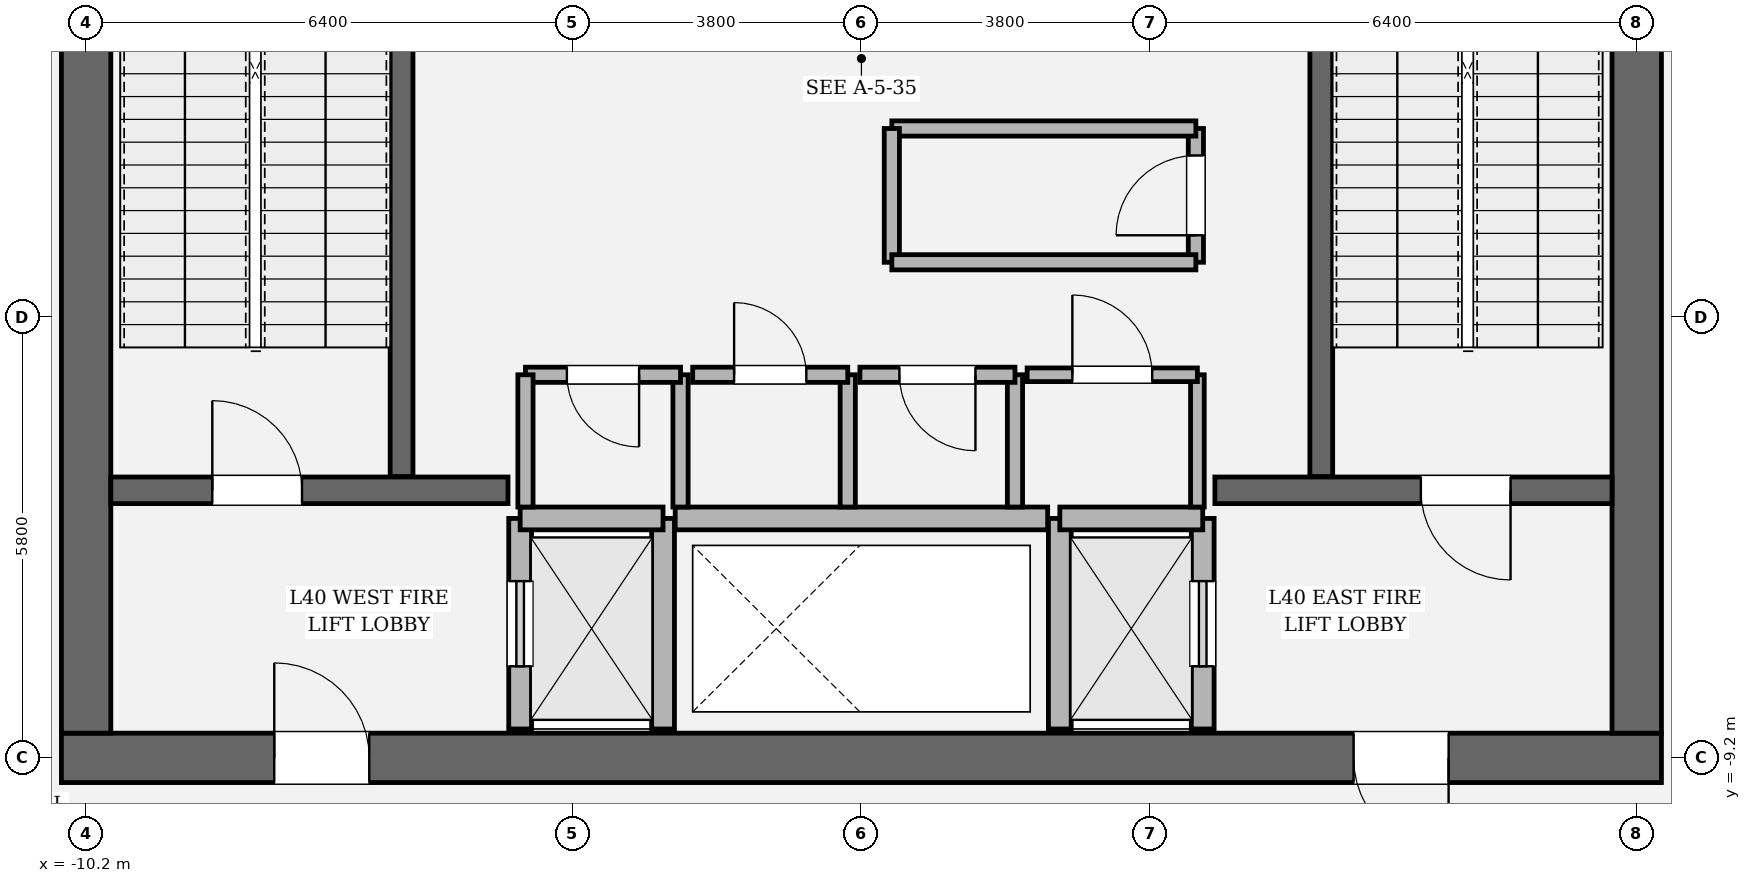
"""IFC4 building model, lengths in metres.
Left out: names, types, materials, properties, quantities, classifications, styles, units other than length and angle.
Written with IfcOpenShell. Run it as: python <this file> out.ifc"""

import sys

from ifc_helpers import new_model, si_unit, direction, frame, frame_2d, origin, place, context, subcontext, project, spatial, rectangle, extrude, element, fill, save


model = new_model("IFC4")
c1 = context("Model", 3, precision=1e-05, world=origin(), true_north=direction((0.0, 1.0)))
c2 = subcontext(c1, "Body", "Model", "MODEL_VIEW")
j1 = project(units=[si_unit("LENGTHUNIT", "METRE"), si_unit("PLANEANGLEUNIT", "RADIAN")], contexts=[c1])
p1 = place(None, origin())
s1 = spatial("IfcSite", under=j1, at=p1, CompositionType="ELEMENT")
p2 = place(p1, origin())
s2 = spatial("IfcBuilding", under=s1, at=p2, CompositionType="ELEMENT")
p3 = place(p2, frame((0.0, 0.0, 172.2)))
s3 = spatial("IfcBuildingStorey", under=s2, at=p3, CompositionType="ELEMENT", Elevation=172.2)
p4 = place(p3, frame((10.525, -9.2, 0.0), z_axis=(0.0, 0.0, 1.0), x_axis=(-1.0, 0.0, 0.0)))
e1 = element("IfcWall", 1, at=p4, inside=s3, PredefinedType="SHEAR", context=c2, shape_type="SweptSolid", body=[
    extrude(rectangle(XDim=21.05, YDim=0.65, at=frame_2d((10.525, 0.0))), origin(), (0.0, 0.0, 1.0), 4.05),
])
p5 = place(p4, frame((2.8, 0.0, 0.0)))
e2 = element("IfcOpeningElement", 2, at=p5, cuts=e1, PredefinedType="OPENING", context=c2, shape_type="SweptSolid", body=[
    extrude(rectangle(XDim=1.25, YDim=2.25, at=frame_2d((0.625, 1.125))), frame((0.0, 0.335, 0.0), z_axis=(0.0, -1.0, 0.0), x_axis=(1.0, 0.0, 0.0)), (0.0, 0.0, 1.0), 0.67),
])
p6 = place(p4, frame((17.0, 0.0, 0.0)))
e3 = element("IfcOpeningElement", 3, at=p6, cuts=e1, PredefinedType="OPENING", context=c2, shape_type="SweptSolid", body=[
    extrude(rectangle(XDim=1.25, YDim=2.25, at=frame_2d((0.625, 1.125))), frame((0.0, 0.335, 0.0), z_axis=(0.0, -1.0, 0.0), x_axis=(1.0, 0.0, 0.0)), (0.0, 0.0, 1.0), 0.67),
])
p7 = place(p3, frame((-10.2, -8.875, 0.0), z_axis=(0.0, 0.0, 1.0), x_axis=(0.0, 1.0, 0.0)))
e4 = element("IfcWall", 4, at=p7, inside=s3, PredefinedType="SHEAR", context=c2, shape_type="SweptSolid", body=[
    extrude(rectangle(XDim=17.75, YDim=0.65, at=frame_2d((8.875, 0.0))), origin(), (0.0, 0.0, 1.0), 4.05),
])
p8 = place(p7, frame((12.665, 0.0, 0.0)))
e5 = element("IfcOpeningElement", 5, at=p8, cuts=e4, PredefinedType="OPENING", context=c2, shape_type="SweptSolid", body=[
    extrude(rectangle(XDim=1.18, YDim=2.2, at=frame_2d((0.59, 1.1))), frame((0.0, 0.335, 0.0), z_axis=(0.0, -1.0, 0.0), x_axis=(1.0, 0.0, 0.0)), (0.0, 0.0, 1.0), 0.67),
])
p9 = place(p3, frame((10.2, 8.875, 0.0), z_axis=(0.0, 0.0, 1.0), x_axis=(0.0, -1.0, 0.0)))
e6 = element("IfcWall", 6, at=p9, inside=s3, PredefinedType="SHEAR", context=c2, shape_type="SweptSolid", body=[
    extrude(rectangle(XDim=17.75, YDim=0.65, at=frame_2d((8.875, 0.0))), origin(), (0.0, 0.0, 1.0), 4.05),
])
p10 = place(p9, frame((3.905, 0.0, 0.0)))
e7 = element("IfcOpeningElement", 7, at=p10, cuts=e6, PredefinedType="OPENING", context=c2, shape_type="SweptSolid", body=[
    extrude(rectangle(XDim=1.18, YDim=2.2, at=frame_2d((0.59, 1.1))), frame((0.0, 0.335, 0.0), z_axis=(0.0, -1.0, 0.0), x_axis=(1.0, 0.0, 0.0)), (0.0, 0.0, 1.0), 0.67),
])
for number, where, z_axis, x_axis in (
    (8, (-6.05, -5.5, 0.0), (0.0, 0.0, 1.0), (0.0, 1.0, 0.0)),
    (9, (6.05, 3.45, 0.0), (0.0, 0.0, 1.0), (0.0, -1.0, 0.0)),
):
    element("IfcWall", number, at=place(p3, frame(where, z_axis=z_axis, x_axis=x_axis)), inside=s3, PredefinedType="SOLIDWALL", context=c2, shape_type="SweptSolid", body=[
        extrude(rectangle(XDim=8.95, YDim=0.3, at=frame_2d((4.475, 0.0))), origin(), (0.0, 0.0, 1.0), 4.05),
    ])
p11 = place(p3, frame((-9.875, -5.68, 0.0), z_axis=(0.0, 0.0, 1.0), x_axis=(1.0, 0.0, 0.0)))
e10 = element("IfcWall", 10, at=p11, inside=s3, PredefinedType="SOLIDWALL", context=c2, shape_type="SweptSolid", body=[
    extrude(rectangle(XDim=5.225, YDim=0.35, at=frame_2d((2.613, 0.0))), origin(), (0.0, 0.0, 1.0), 4.05),
])
p12 = place(p11, frame((1.335, 0.0, 0.0)))
e11 = element("IfcOpeningElement", 11, at=p12, cuts=e10, PredefinedType="OPENING", context=c2, shape_type="SweptSolid", body=[
    extrude(rectangle(XDim=1.18, YDim=2.2, at=frame_2d((0.59, 1.1))), frame((0.0, 0.185, 0.0), z_axis=(0.0, -1.0, 0.0), x_axis=(1.0, 0.0, 0.0)), (0.0, 0.0, 1.0), 0.37),
])
p13 = place(p3, frame((4.65, -5.68, 0.0), z_axis=(0.0, 0.0, 1.0), x_axis=(1.0, 0.0, 0.0)))
e12 = element("IfcWall", 12, at=p13, inside=s3, PredefinedType="SOLIDWALL", context=c2, shape_type="SweptSolid", body=[
    extrude(rectangle(XDim=5.225, YDim=0.35, at=frame_2d((2.613, 0.0))), origin(), (0.0, 0.0, 1.0), 4.05),
])
p14 = place(p13, frame((2.71, 0.0, 0.0)))
e13 = element("IfcOpeningElement", 13, at=p14, cuts=e12, PredefinedType="OPENING", context=c2, shape_type="SweptSolid", body=[
    extrude(rectangle(XDim=1.18, YDim=2.2, at=frame_2d((0.59, 1.1))), frame((0.0, 0.185, 0.0), z_axis=(0.0, -1.0, 0.0), x_axis=(1.0, 0.0, 0.0)), (0.0, 0.0, 1.0), 0.37),
])
p15 = place(p3, frame((-4.49, -8.82, 0.0), z_axis=(0.0, 0.0, 1.0), x_axis=(0.0, 1.0, 0.0)))
e14 = element("IfcWall", 14, at=p15, inside=s3, PredefinedType="SOLIDWALL", context=c2, shape_type="SweptSolid", body=[
    extrude(rectangle(XDim=2.77, YDim=0.3, at=frame_2d((1.385, 0.0))), origin(), (0.0, 0.0, 1.0), 3.83),
])
p16 = place(p15, frame((0.825, 0.0, 0.0)))
e15 = element("IfcOpeningElement", 15, at=p16, cuts=e14, PredefinedType="OPENING", context=c2, shape_type="SweptSolid", body=[
    extrude(rectangle(XDim=1.12, YDim=2.25, at=frame_2d((0.56, 1.125))), frame((0.0, 0.16, 0.0), z_axis=(0.0, -1.0, 0.0), x_axis=(1.0, 0.0, 0.0)), (0.0, 0.0, 1.0), 0.32),
])
p17 = place(p3, frame((-2.61, -8.82, 0.0), z_axis=(0.0, 0.0, 1.0), x_axis=(0.0, 1.0, 0.0)))
e16 = element("IfcWall", 16, at=p17, inside=s3, PredefinedType="SOLIDWALL", context=c2, shape_type="SweptSolid", body=[
    extrude(rectangle(XDim=2.77, YDim=0.3, at=frame_2d((1.385, 0.0))), origin(), (0.0, 0.0, 1.0), 3.83),
])
p18 = place(p3, frame((-4.49, -6.05, 0.0), z_axis=(0.0, 0.0, 1.0), x_axis=(1.0, 0.0, 0.0)))
e17 = element("IfcWall", 17, at=p18, inside=s3, PredefinedType="SOLIDWALL", context=c2, shape_type="SweptSolid", body=[
    extrude(rectangle(XDim=1.88, YDim=0.3, at=frame_2d((0.94, 0.0))), origin(), (0.0, 0.0, 1.0), 3.83),
])
p19 = place(p3, frame((4.49, -8.82, 0.0), z_axis=(0.0, 0.0, 1.0), x_axis=(0.0, 1.0, 0.0)))
e18 = element("IfcWall", 18, at=p19, inside=s3, PredefinedType="SOLIDWALL", context=c2, shape_type="SweptSolid", body=[
    extrude(rectangle(XDim=2.77, YDim=0.3, at=frame_2d((1.385, 0.0))), origin(), (0.0, 0.0, 1.0), 3.83),
])
p20 = place(p19, frame((0.825, 0.0, 0.0)))
e19 = element("IfcOpeningElement", 19, at=p20, cuts=e18, PredefinedType="OPENING", context=c2, shape_type="SweptSolid", body=[
    extrude(rectangle(XDim=1.12, YDim=2.25, at=frame_2d((0.56, 1.125))), frame((0.0, 0.16, 0.0), z_axis=(0.0, -1.0, 0.0), x_axis=(1.0, 0.0, 0.0)), (0.0, 0.0, 1.0), 0.32),
])
p21 = place(p3, frame((2.61, -8.82, 0.0), z_axis=(0.0, 0.0, 1.0), x_axis=(0.0, 1.0, 0.0)))
e20 = element("IfcWall", 20, at=p21, inside=s3, PredefinedType="SOLIDWALL", context=c2, shape_type="SweptSolid", body=[
    extrude(rectangle(XDim=2.77, YDim=0.3, at=frame_2d((1.385, 0.0))), origin(), (0.0, 0.0, 1.0), 3.83),
])
p22 = place(p3, frame((2.61, -6.05, 0.0), z_axis=(0.0, 0.0, 1.0), x_axis=(1.0, 0.0, 0.0)))
e21 = element("IfcWall", 21, at=p22, inside=s3, PredefinedType="SOLIDWALL", context=c2, shape_type="SweptSolid", body=[
    extrude(rectangle(XDim=1.88, YDim=0.3, at=frame_2d((0.94, 0.0))), origin(), (0.0, 0.0, 1.0), 3.83),
])
p23 = place(p3, frame((-2.45, -6.05, 0.0), z_axis=(0.0, 0.0, 1.0), x_axis=(1.0, 0.0, 0.0)))
e22 = element("IfcWall", 22, at=p23, inside=s3, PredefinedType="SOLIDWALL", context=c2, shape_type="SweptSolid", body=[
    extrude(rectangle(XDim=4.9, YDim=0.3, at=frame_2d((2.45, 0.0))), origin(), (0.0, 0.0, 1.0), 3.83),
])
p24 = place(p3, frame((-2.38, -5.9, 0.0), z_axis=(0.0, 0.0, 1.0), x_axis=(0.0, 1.0, 0.0)))
e23 = element("IfcWall", 23, at=p24, inside=s3, PredefinedType="SOLIDWALL", context=c2, shape_type="SweptSolid", body=[
    extrude(rectangle(XDim=1.74, YDim=0.2, at=frame_2d((0.87, 0.0))), origin(), (0.0, 0.0, 1.0), 3.83),
])
p25 = place(p3, frame((-2.38, -4.16, 0.0), z_axis=(0.0, 0.0, 1.0), x_axis=(-1.0, 0.0, 0.0)))
e24 = element("IfcWall", 24, at=p25, inside=s3, PredefinedType="SOLIDWALL", context=c2, shape_type="SweptSolid", body=[
    extrude(rectangle(XDim=2.04, YDim=0.2, at=frame_2d((1.02, 0.0))), origin(), (0.0, 0.0, 1.0), 3.83),
])
p26 = place(p25, frame((0.545, 0.0, 0.0)))
e25 = element("IfcOpeningElement", 25, at=p26, cuts=e24, PredefinedType="OPENING", context=c2, shape_type="SweptSolid", body=[
    extrude(rectangle(XDim=0.95, YDim=2.15, at=frame_2d((0.475, 1.075))), frame((0.0, 0.11, 0.0), z_axis=(0.0, -1.0, 0.0), x_axis=(1.0, 0.0, 0.0)), (0.0, 0.0, 1.0), 0.22),
])
for number, where, z_axis, x_axis in (
    (26, (-4.42, -4.16, 0.0), (0.0, 0.0, 1.0), (0.0, -1.0, 0.0)),
    (27, (-0.18, -5.9, 0.0), (0.0, 0.0, 1.0), (0.0, 1.0, 0.0)),
):
    element("IfcWall", number, at=place(p3, frame(where, z_axis=z_axis, x_axis=x_axis)), inside=s3, PredefinedType="SOLIDWALL", context=c2, shape_type="SweptSolid", body=[
        extrude(rectangle(XDim=1.74, YDim=0.2, at=frame_2d((0.87, 0.0))), origin(), (0.0, 0.0, 1.0), 3.83),
    ])
p27 = place(p3, frame((-0.18, -4.16, 0.0), z_axis=(0.0, 0.0, 1.0), x_axis=(-1.0, 0.0, 0.0)))
e28 = element("IfcWall", 28, at=p27, inside=s3, PredefinedType="SOLIDWALL", context=c2, shape_type="SweptSolid", body=[
    extrude(rectangle(XDim=2.04, YDim=0.2, at=frame_2d((1.02, 0.0))), origin(), (0.0, 0.0, 1.0), 3.83),
])
p28 = place(p27, frame((0.545, 0.0, 0.0)))
e29 = element("IfcOpeningElement", 29, at=p28, cuts=e28, PredefinedType="OPENING", context=c2, shape_type="SweptSolid", body=[
    extrude(rectangle(XDim=0.95, YDim=2.15, at=frame_2d((0.475, 1.075))), frame((0.0, 0.11, 0.0), z_axis=(0.0, -1.0, 0.0), x_axis=(1.0, 0.0, 0.0)), (0.0, 0.0, 1.0), 0.22),
])
p29 = place(p3, frame((2.02, -5.9, 0.0), z_axis=(0.0, 0.0, 1.0), x_axis=(0.0, 1.0, 0.0)))
e30 = element("IfcWall", 30, at=p29, inside=s3, PredefinedType="SOLIDWALL", context=c2, shape_type="SweptSolid", body=[
    extrude(rectangle(XDim=1.74, YDim=0.2, at=frame_2d((0.87, 0.0))), origin(), (0.0, 0.0, 1.0), 3.83),
])
p30 = place(p3, frame((2.02, -4.16, 0.0), z_axis=(0.0, 0.0, 1.0), x_axis=(-1.0, 0.0, 0.0)))
e31 = element("IfcWall", 31, at=p30, inside=s3, PredefinedType="SOLIDWALL", context=c2, shape_type="SweptSolid", body=[
    extrude(rectangle(XDim=2.04, YDim=0.2, at=frame_2d((1.02, 0.0))), origin(), (0.0, 0.0, 1.0), 3.83),
])
p31 = place(p30, frame((0.52, 0.0, 0.0)))
e32 = element("IfcOpeningElement", 32, at=p31, cuts=e31, PredefinedType="OPENING", context=c2, shape_type="SweptSolid", body=[
    extrude(rectangle(XDim=1.0, YDim=2.15, at=frame_2d((0.5, 1.075))), frame((0.0, 0.11, 0.0), z_axis=(0.0, -1.0, 0.0), x_axis=(1.0, 0.0, 0.0)), (0.0, 0.0, 1.0), 0.22),
])
p32 = place(p3, frame((4.42, -5.9, 0.0), z_axis=(0.0, 0.0, 1.0), x_axis=(0.0, 1.0, 0.0)))
e33 = element("IfcWall", 33, at=p32, inside=s3, PredefinedType="PARTITIONING", context=c2, shape_type="SweptSolid", body=[
    extrude(rectangle(XDim=1.74, YDim=0.18, at=frame_2d((0.87, 0.0))), origin(), (0.0, 0.0, 1.0), 3.83),
])
p33 = place(p3, frame((4.42, -4.16, 0.0), z_axis=(0.0, 0.0, 1.0), x_axis=(-1.0, 0.0, 0.0)))
e34 = element("IfcWall", 34, at=p33, inside=s3, PredefinedType="PARTITIONING", context=c2, shape_type="SweptSolid", body=[
    extrude(rectangle(XDim=2.24, YDim=0.18, at=frame_2d((1.12, 0.0))), origin(), (0.0, 0.0, 1.0), 3.83),
])
p34 = place(p33, frame((0.595, 0.0, 0.0)))
e35 = element("IfcOpeningElement", 35, at=p34, cuts=e34, PredefinedType="OPENING", context=c2, shape_type="SweptSolid", body=[
    extrude(rectangle(XDim=1.05, YDim=2.2, at=frame_2d((0.525, 1.1))), frame((0.0, 0.1, 0.0), z_axis=(0.0, -1.0, 0.0), x_axis=(1.0, 0.0, 0.0)), (0.0, 0.0, 1.0), 0.2),
])
p35 = place(p3, frame((4.4, -2.68, 0.0), z_axis=(0.0, 0.0, 1.0), x_axis=(0.0, 1.0, 0.0)))
e36 = element("IfcWall", 36, at=p35, inside=s3, PredefinedType="SOLIDWALL", context=c2, shape_type="SweptSolid", body=[
    extrude(rectangle(XDim=1.76, YDim=0.2, at=frame_2d((0.88, 0.0))), origin(), (0.0, 0.0, 1.0), 3.83),
])
p36 = place(p35, frame((0.355, 0.0, 0.0)))
e37 = element("IfcOpeningElement", 37, at=p36, cuts=e36, PredefinedType="OPENING", context=c2, shape_type="SweptSolid", body=[
    extrude(rectangle(XDim=1.05, YDim=2.2, at=frame_2d((0.525, 1.1))), frame((0.0, 0.11, 0.0), z_axis=(0.0, -1.0, 0.0), x_axis=(1.0, 0.0, 0.0)), (0.0, 0.0, 1.0), 0.22),
])
p37 = place(p3, frame((4.4, -0.92, 0.0), z_axis=(0.0, 0.0, 1.0), x_axis=(-1.0, 0.0, 0.0)))
e38 = element("IfcWall", 38, at=p37, inside=s3, PredefinedType="SOLIDWALL", context=c2, shape_type="SweptSolid", body=[
    extrude(rectangle(XDim=4.0, YDim=0.2, at=frame_2d((2.0, 0.0))), origin(), (0.0, 0.0, 1.0), 3.83),
])
p38 = place(p3, frame((0.4, -0.92, 0.0), z_axis=(0.0, 0.0, 1.0), x_axis=(0.0, -1.0, 0.0)))
e39 = element("IfcWall", 39, at=p38, inside=s3, PredefinedType="SOLIDWALL", context=c2, shape_type="SweptSolid", body=[
    extrude(rectangle(XDim=1.76, YDim=0.2, at=frame_2d((0.88, 0.0))), origin(), (0.0, 0.0, 1.0), 3.83),
])
p39 = place(p3, frame((0.4, -2.68, 0.0), z_axis=(0.0, 0.0, 1.0), x_axis=(1.0, 0.0, 0.0)))
e40 = element("IfcWall", 40, at=p39, inside=s3, PredefinedType="SOLIDWALL", context=c2, shape_type="SweptSolid", body=[
    extrude(rectangle(XDim=4.0, YDim=0.2, at=frame_2d((2.0, 0.0))), origin(), (0.0, 0.0, 1.0), 3.83),
])
p40 = place(p12, origin())
e41 = element("IfcDoor", 41, at=p40, inside=s3, OperationType="SINGLE_SWING_LEFT", PredefinedType="DOOR", context=c2, shape_type="SweptSolid", body=[
    extrude(rectangle(XDim=1.18, YDim=2.2, at=frame_2d((0.59, 1.1))), frame((0.0, 0.025, 0.0), z_axis=(0.0, -1.0, 0.0), x_axis=(1.0, 0.0, 0.0)), (0.0, 0.0, 1.0), 0.05),
])
fill(e11, e41)
p41 = place(p14, origin())
e42 = element("IfcDoor", 42, at=p41, inside=s3, OperationType="SINGLE_SWING_RIGHT", PredefinedType="DOOR", context=c2, shape_type="SweptSolid", body=[
    extrude(rectangle(XDim=1.18, YDim=2.2, at=frame_2d((0.59, 1.1))), frame((0.0, 0.025, 0.0), z_axis=(0.0, -1.0, 0.0), x_axis=(1.0, 0.0, 0.0)), (0.0, 0.0, 1.0), 0.05),
])
fill(e13, e42)
p42 = place(p5, origin())
e43 = element("IfcDoor", 43, at=p42, inside=s3, OperationType="SINGLE_SWING_LEFT", PredefinedType="DOOR", context=c2, shape_type="SweptSolid", body=[
    extrude(rectangle(XDim=1.25, YDim=2.25, at=frame_2d((0.625, 1.125))), frame((0.0, 0.025, 0.0), z_axis=(0.0, -1.0, 0.0), x_axis=(1.0, 0.0, 0.0)), (0.0, 0.0, 1.0), 0.05),
])
fill(e2, e43)
p43 = place(p6, origin())
e44 = element("IfcDoor", 44, at=p43, inside=s3, OperationType="SINGLE_SWING_RIGHT", PredefinedType="DOOR", context=c2, shape_type="SweptSolid", body=[
    extrude(rectangle(XDim=1.25, YDim=2.25, at=frame_2d((0.625, 1.125))), frame((0.0, 0.025, 0.0), z_axis=(0.0, -1.0, 0.0), x_axis=(1.0, 0.0, 0.0)), (0.0, 0.0, 1.0), 0.05),
])
fill(e3, e44)
p44 = place(p16, origin())
e45 = element("IfcDoor", 45, at=p44, inside=s3, OperationType="SLIDING_TO_LEFT", PredefinedType="DOOR", context=c2, shape_type="SweptSolid", body=[
    extrude(rectangle(XDim=1.12, YDim=2.25, at=frame_2d((0.56, 1.125))), frame((0.0, 0.025, 0.0), z_axis=(0.0, -1.0, 0.0), x_axis=(1.0, 0.0, 0.0)), (0.0, 0.0, 1.0), 0.05),
])
fill(e15, e45)
p45 = place(p20, origin())
e46 = element("IfcDoor", 46, at=p45, inside=s3, OperationType="SLIDING_TO_RIGHT", PredefinedType="DOOR", context=c2, shape_type="SweptSolid", body=[
    extrude(rectangle(XDim=1.12, YDim=2.25, at=frame_2d((0.56, 1.125))), frame((0.0, 0.025, 0.0), z_axis=(0.0, -1.0, 0.0), x_axis=(1.0, 0.0, 0.0)), (0.0, 0.0, 1.0), 0.05),
])
fill(e19, e46)
p46 = place(p26, origin())
e47 = element("IfcDoor", 47, at=p46, inside=s3, OperationType="SINGLE_SWING_LEFT", PredefinedType="DOOR", context=c2, shape_type="SweptSolid", body=[
    extrude(rectangle(XDim=0.95, YDim=2.15, at=frame_2d((0.475, 1.075))), frame((0.0, 0.025, 0.0), z_axis=(0.0, -1.0, 0.0), x_axis=(1.0, 0.0, 0.0)), (0.0, 0.0, 1.0), 0.05),
])
fill(e25, e47)
p47 = place(p28, origin())
e48 = element("IfcDoor", 48, at=p47, inside=s3, OperationType="SINGLE_SWING_RIGHT", PredefinedType="DOOR", context=c2, shape_type="SweptSolid", body=[
    extrude(rectangle(XDim=0.95, YDim=2.15, at=frame_2d((0.475, 1.075))), frame((0.0, 0.025, 0.0), z_axis=(0.0, -1.0, 0.0), x_axis=(1.0, 0.0, 0.0)), (0.0, 0.0, 1.0), 0.05),
])
fill(e29, e48)
p48 = place(p31, origin())
e49 = element("IfcDoor", 49, at=p48, inside=s3, OperationType="SINGLE_SWING_LEFT", PredefinedType="DOOR", context=c2, shape_type="SweptSolid", body=[
    extrude(rectangle(XDim=1.0, YDim=2.15, at=frame_2d((0.5, 1.075))), frame((0.0, 0.025, 0.0), z_axis=(0.0, -1.0, 0.0), x_axis=(1.0, 0.0, 0.0)), (0.0, 0.0, 1.0), 0.05),
])
fill(e32, e49)
p49 = place(p34, origin())
e50 = element("IfcDoor", 50, at=p49, inside=s3, OperationType="SINGLE_SWING_RIGHT", PredefinedType="DOOR", context=c2, shape_type="SweptSolid", body=[
    extrude(rectangle(XDim=1.05, YDim=2.2, at=frame_2d((0.525, 1.1))), frame((0.0, 0.025, 0.0), z_axis=(0.0, -1.0, 0.0), x_axis=(1.0, 0.0, 0.0)), (0.0, 0.0, 1.0), 0.05),
])
fill(e35, e50)
p50 = place(p36, origin())
e51 = element("IfcDoor", 51, at=p50, inside=s3, OperationType="SINGLE_SWING_LEFT", PredefinedType="DOOR", context=c2, shape_type="SweptSolid", body=[
    extrude(rectangle(XDim=1.05, YDim=2.2, at=frame_2d((0.525, 1.1))), frame((0.0, 0.025, 0.0), z_axis=(0.0, -1.0, 0.0), x_axis=(1.0, 0.0, 0.0)), (0.0, 0.0, 1.0), 0.05),
])
fill(e37, e51)
save(model, sys.argv[1])
